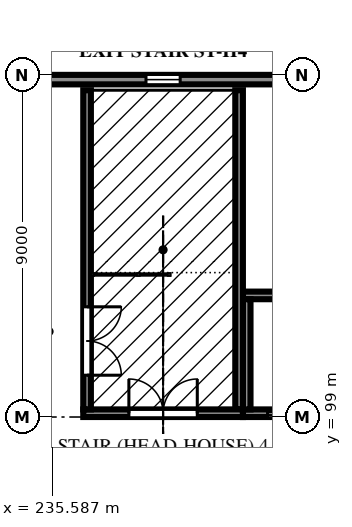
"""IFC4 building model, lengths in metres.
Left out: names, types, materials, properties, quantities, classifications, styles, units other than length and angle.
Written with IfcOpenShell. Run it as: python <this file> out.ifc"""

import sys

from ifc_helpers import new_model, si_unit, direction, frame, frame_2d, origin, place, context, subcontext, project, spatial, polyline, rectangle, outline, extrude, element, fill, save


model = new_model("IFC4")
c1 = context("Model", 3, precision=1e-05, world=origin(), true_north=direction((0.0, 1.0)))
c2 = subcontext(c1, "Body", "Model", "MODEL_VIEW")
j1 = project(units=[si_unit("LENGTHUNIT", "METRE"), si_unit("PLANEANGLEUNIT", "RADIAN")], contexts=[c1])
p1 = place(None, origin())
s1 = spatial("IfcSite", under=j1, at=p1, CompositionType="ELEMENT")
p2 = place(p1, origin())
s2 = spatial("IfcBuilding", under=s1, at=p2, CompositionType="ELEMENT")
p3 = place(p2, frame((0.0, 0.0, 7.5)))
s3 = spatial("IfcBuildingStorey", under=s2, at=p3, CompositionType="ELEMENT", Elevation=7.5)
p4 = place(p3, frame((234.128, 107.878, 0.0), z_axis=(0.0, 0.0, 1.0), x_axis=(1.0, 0.0, 0.0)))
e1 = element("IfcWall", 1, at=p4, inside=s3, PredefinedType="SOLIDWALL", context=c2, shape_type="SweptSolid", body=[
    extrude(rectangle(XDim=8.744, YDim=0.25, at=frame_2d((4.372, 0.0))), origin(), (0.0, 0.0, 1.0), 4.05),
])
p5 = place(p4, frame((3.922, 0.0, 1.2)))
e2 = element("IfcOpeningElement", 2, at=p5, cuts=e1, PredefinedType="OPENING", context=c2, shape_type="SweptSolid", body=[
    extrude(rectangle(XDim=0.9, YDim=1.8, at=frame_2d((0.45, 0.9))), frame((0.0, 0.135, 0.0), z_axis=(0.0, -1.0, 0.0), x_axis=(1.0, 0.0, 0.0)), (0.0, 0.0, 1.0), 0.27),
])
p6 = place(p3, frame((236.4, 99.1, -0.13), z_axis=(0.0, 0.0, 1.0), x_axis=(1.0, 0.0, 0.0)))
e3 = element("IfcWall", 3, at=p6, inside=s3, PredefinedType="SOLIDWALL", context=c2, shape_type="SweptSolid", body=[
    extrude(rectangle(XDim=4.2, YDim=0.2, at=frame_2d((2.1, 0.0))), origin(), (0.0, 0.0, 1.0), 3.72),
])
p7 = place(p6, frame((1.2, 0.0, 0.13)))
e4 = element("IfcOpeningElement", 4, at=p7, cuts=e3, PredefinedType="OPENING", context=c2, shape_type="SweptSolid", body=[
    extrude(rectangle(XDim=1.8, YDim=2.1, at=frame_2d((0.9, 1.05))), frame((0.0, 0.11, 0.0), z_axis=(0.0, -1.0, 0.0), x_axis=(1.0, 0.0, 0.0)), (0.0, 0.0, 1.0), 0.22),
])
p8 = place(p3, frame((236.5, 99.2, -0.13), z_axis=(0.0, 0.0, 1.0), x_axis=(0.0, 1.0, 0.0)))
e5 = element("IfcWall", 5, at=p8, inside=s3, PredefinedType="SOLIDWALL", context=c2, shape_type="SweptSolid", body=[
    extrude(rectangle(XDim=8.4, YDim=0.2, at=frame_2d((4.2, 0.0))), origin(), (0.0, 0.0, 1.0), 3.72),
])
p9 = place(p8, frame((0.9, 0.0, 0.13)))
e6 = element("IfcOpeningElement", 6, at=p9, cuts=e5, PredefinedType="OPENING", context=c2, shape_type="SweptSolid", body=[
    extrude(rectangle(XDim=1.8, YDim=2.1, at=frame_2d((0.9, 1.05))), frame((0.0, 0.11, 0.0), z_axis=(0.0, -1.0, 0.0), x_axis=(1.0, 0.0, 0.0)), (0.0, 0.0, 1.0), 0.22),
])
p10 = place(p3, frame((240.5, 99.2, -0.13), z_axis=(0.0, 0.0, 1.0), x_axis=(0.0, 1.0, 0.0)))
e7 = element("IfcWall", 7, at=p10, inside=s3, PredefinedType="SOLIDWALL", context=c2, shape_type="SweptSolid", body=[
    extrude(rectangle(XDim=8.4, YDim=0.2, at=frame_2d((4.2, 0.0))), origin(), (0.0, 0.0, 1.0), 3.72),
])
p11 = place(p3, frame((240.602, 99.1, 0.0), z_axis=(0.0, 0.0, 1.0), x_axis=(1.0, 0.0, 0.0)))
e8 = element("IfcWall", 8, at=p11, inside=s3, PredefinedType="SOLIDWALL", context=c2, shape_type="SweptSolid", body=[
    extrude(rectangle(XDim=2.398, YDim=0.2, at=frame_2d((1.199, 0.0))), origin(), (0.0, 0.0, 1.0), 3.516),
])
p12 = place(p11, frame((0.648, 0.0, 0.0)))
e9 = element("IfcOpeningElement", 9, at=p12, cuts=e8, PredefinedType="OPENING", context=c2, shape_type="SweptSolid", body=[
    extrude(rectangle(XDim=1.1, YDim=2.1, at=frame_2d((0.55, 1.05))), frame((0.0, 0.11, 0.0), z_axis=(0.0, -1.0, 0.0), x_axis=(1.0, 0.0, 0.0)), (0.0, 0.0, 1.0), 0.22),
])
p13 = place(p3, frame((240.602, 102.2, 0.0), z_axis=(0.0, 0.0, 1.0), x_axis=(1.0, 0.0, 0.0)))
e10 = element("IfcWall", 10, at=p13, inside=s3, PredefinedType="SOLIDWALL", context=c2, shape_type="SweptSolid", body=[
    extrude(rectangle(XDim=2.256, YDim=0.2, at=frame_2d((1.128, 0.0))), origin(), (0.0, 0.0, 1.0), 3.516),
])
p14 = place(p3, frame((240.7, 99.2, 0.0), z_axis=(0.0, 0.0, 1.0), x_axis=(0.0, 1.0, 0.0)))
e11 = element("IfcWall", 11, at=p14, inside=s3, PredefinedType="SOLIDWALL", context=c2, shape_type="SweptSolid", body=[
    extrude(rectangle(XDim=2.9, YDim=0.2, at=frame_2d((1.45, 0.0))), origin(), (0.0, 0.0, 1.0), 3.516),
])
p15 = place(p5, origin())
e12 = element("IfcWindow", 12, at=p15, inside=s3, PartitioningType="SINGLE_PANEL", PredefinedType="WINDOW", context=c2, shape_type="SweptSolid", body=[
    extrude(outline(polyline([(0.0, 0.0), (0.9, 0.0), (0.9, 1.8), (0.0, 1.8), (0.0, 0.0)]), holes=[polyline([(0.07, 0.07), (0.83, 0.07), (0.83, 1.73), (0.07, 1.73), (0.07, 0.07)])]), frame((0.0, 0.03, 0.0), z_axis=(0.0, -1.0, 0.0), x_axis=(1.0, 0.0, 0.0)), (0.0, 0.0, 1.0), 0.06),
    extrude(outline(polyline([(0.07, 0.07), (0.83, 0.07), (0.83, 1.73), (0.07, 1.73), (0.07, 0.07)]), holes=[polyline([(0.1, 0.1), (0.8, 0.1), (0.8, 1.7), (0.1, 1.7), (0.1, 0.1)])]), frame((0.0, 0.022, 0.0), z_axis=(0.0, -1.0, 0.0), x_axis=(1.0, 0.0, 0.0)), (0.0, 0.0, 1.0), 0.045),
    extrude(rectangle(XDim=0.7, YDim=1.6, at=frame_2d((0.45, 0.9))), frame((0.0, 0.006, 0.0), z_axis=(0.0, -1.0, 0.0), x_axis=(1.0, 0.0, 0.0)), (0.0, 0.0, 1.0), 0.012),
])
fill(e2, e12)
p16 = place(p12, origin())
e13 = element("IfcDoor", 13, at=p16, inside=s3, OperationType="SLIDING_TO_LEFT", PredefinedType="DOOR", context=c2, shape_type="SweptSolid", body=[
    extrude(outline(polyline([(0.0, 0.0), (0.07, 0.0), (0.07, 2.03), (1.03, 2.03), (1.03, 0.0), (1.1, 0.0), (1.1, 2.1), (0.0, 2.1), (0.0, 0.0)])), frame((0.0, 0.025, 0.0), z_axis=(0.0, -1.0, 0.0), x_axis=(1.0, 0.0, 0.0)), (0.0, 0.0, 1.0), 0.05),
    extrude(rectangle(XDim=0.524, YDim=2.016, at=frame_2d((0.336, 1.018))), frame((0.0, 0.018, 0.0), z_axis=(0.0, -1.0, 0.0), x_axis=(1.0, 0.0, 0.0)), (0.0, 0.0, 1.0), 0.016),
    extrude(rectangle(XDim=0.52, YDim=2.016, at=frame_2d((0.766, 1.018))), frame((0.0, -0.002, 0.0), z_axis=(0.0, -1.0, 0.0), x_axis=(1.0, 0.0, 0.0)), (0.0, 0.0, 1.0), 0.016),
])
fill(e9, e13)
p17 = place(p9, frame((1.8, 0.0, 0.0), z_axis=(0.0, 0.0, 1.0), x_axis=(-1.0, 0.0, 0.0)))
e14 = element("IfcDoor", 14, at=p17, inside=s3, OperationType="DOUBLE_DOOR_SINGLE_SWING", PredefinedType="DOOR", context=c2, shape_type="SweptSolid", body=[
    extrude(outline(polyline([(0.0, 0.0), (0.07, 0.0), (0.07, 2.03), (1.73, 2.03), (1.73, 0.0), (1.8, 0.0), (1.8, 2.1), (0.0, 2.1), (0.0, 0.0)])), frame((0.0, 0.025, 0.0), z_axis=(0.0, -1.0, 0.0), x_axis=(1.0, 0.0, 0.0)), (0.0, 0.0, 1.0), 0.05),
    extrude(outline(polyline([(0.074, 0.01), (0.897, 0.01), (0.897, 2.026), (0.074, 2.026), (0.074, 0.01)]), holes=[polyline([(0.194, 0.16), (0.777, 0.16), (0.777, 1.01), (0.194, 1.01), (0.194, 0.16)]), polyline([(0.335, 1.16), (0.635, 1.16), (0.635, 1.76), (0.335, 1.76), (0.335, 1.16)])]), frame((0.0, 0.017, 0.0), z_axis=(0.0, -1.0, 0.0), x_axis=(1.0, 0.0, 0.0)), (0.0, 0.0, 1.0), 0.035),
    extrude(rectangle(XDim=0.583, YDim=0.85, at=frame_2d((0.485, 0.585))), frame((0.0, 0.009, 0.0), z_axis=(0.0, -1.0, 0.0), x_axis=(1.0, 0.0, 0.0)), (0.0, 0.0, 1.0), 0.017),
    extrude(rectangle(XDim=0.3, YDim=0.6, at=frame_2d((0.485, 1.46))), frame((0.0, 0.006, 0.0), z_axis=(0.0, -1.0, 0.0), x_axis=(1.0, 0.0, 0.0)), (0.0, 0.0, 1.0), 0.012),
    extrude(outline(polyline([(0.903, 0.01), (1.726, 0.01), (1.726, 2.026), (0.903, 2.026), (0.903, 0.01)]), holes=[polyline([(1.023, 0.16), (1.606, 0.16), (1.606, 1.01), (1.023, 1.01), (1.023, 0.16)]), polyline([(1.165, 1.16), (1.465, 1.16), (1.465, 1.76), (1.165, 1.76), (1.165, 1.16)])]), frame((0.0, 0.017, 0.0), z_axis=(0.0, -1.0, 0.0), x_axis=(1.0, 0.0, 0.0)), (0.0, 0.0, 1.0), 0.035),
    extrude(rectangle(XDim=0.583, YDim=0.85, at=frame_2d((1.314, 0.585))), frame((0.0, 0.009, 0.0), z_axis=(0.0, -1.0, 0.0), x_axis=(1.0, 0.0, 0.0)), (0.0, 0.0, 1.0), 0.017),
    extrude(rectangle(XDim=0.3, YDim=0.6, at=frame_2d((1.314, 1.46))), frame((0.0, 0.006, 0.0), z_axis=(0.0, -1.0, 0.0), x_axis=(1.0, 0.0, 0.0)), (0.0, 0.0, 1.0), 0.012),
])
fill(e6, e14)
p18 = place(p7, origin())
e15 = element("IfcDoor", 15, at=p18, inside=s3, OperationType="DOUBLE_DOOR_SINGLE_SWING", PredefinedType="DOOR", context=c2, shape_type="SweptSolid", body=[
    extrude(outline(polyline([(0.0, 0.0), (0.07, 0.0), (0.07, 2.03), (1.73, 2.03), (1.73, 0.0), (1.8, 0.0), (1.8, 2.1), (0.0, 2.1), (0.0, 0.0)])), frame((0.0, 0.025, 0.0), z_axis=(0.0, -1.0, 0.0), x_axis=(1.0, 0.0, 0.0)), (0.0, 0.0, 1.0), 0.05),
    extrude(outline(polyline([(0.074, 0.01), (0.897, 0.01), (0.897, 2.026), (0.074, 2.026), (0.074, 0.01)]), holes=[polyline([(0.194, 0.16), (0.777, 0.16), (0.777, 1.01), (0.194, 1.01), (0.194, 0.16)]), polyline([(0.335, 1.16), (0.635, 1.16), (0.635, 1.76), (0.335, 1.76), (0.335, 1.16)])]), frame((0.0, 0.017, 0.0), z_axis=(0.0, -1.0, 0.0), x_axis=(1.0, 0.0, 0.0)), (0.0, 0.0, 1.0), 0.035),
    extrude(rectangle(XDim=0.583, YDim=0.85, at=frame_2d((0.485, 0.585))), frame((0.0, 0.009, 0.0), z_axis=(0.0, -1.0, 0.0), x_axis=(1.0, 0.0, 0.0)), (0.0, 0.0, 1.0), 0.017),
    extrude(rectangle(XDim=0.3, YDim=0.6, at=frame_2d((0.485, 1.46))), frame((0.0, 0.006, 0.0), z_axis=(0.0, -1.0, 0.0), x_axis=(1.0, 0.0, 0.0)), (0.0, 0.0, 1.0), 0.012),
    extrude(outline(polyline([(0.903, 0.01), (1.726, 0.01), (1.726, 2.026), (0.903, 2.026), (0.903, 0.01)]), holes=[polyline([(1.023, 0.16), (1.606, 0.16), (1.606, 1.01), (1.023, 1.01), (1.023, 0.16)]), polyline([(1.165, 1.16), (1.465, 1.16), (1.465, 1.76), (1.165, 1.76), (1.165, 1.16)])]), frame((0.0, 0.017, 0.0), z_axis=(0.0, -1.0, 0.0), x_axis=(1.0, 0.0, 0.0)), (0.0, 0.0, 1.0), 0.035),
    extrude(rectangle(XDim=0.583, YDim=0.85, at=frame_2d((1.314, 0.585))), frame((0.0, 0.009, 0.0), z_axis=(0.0, -1.0, 0.0), x_axis=(1.0, 0.0, 0.0)), (0.0, 0.0, 1.0), 0.017),
    extrude(rectangle(XDim=0.3, YDim=0.6, at=frame_2d((1.314, 1.46))), frame((0.0, 0.006, 0.0), z_axis=(0.0, -1.0, 0.0), x_axis=(1.0, 0.0, 0.0)), (0.0, 0.0, 1.0), 0.012),
])
fill(e4, e15)
save(model, sys.argv[1])
